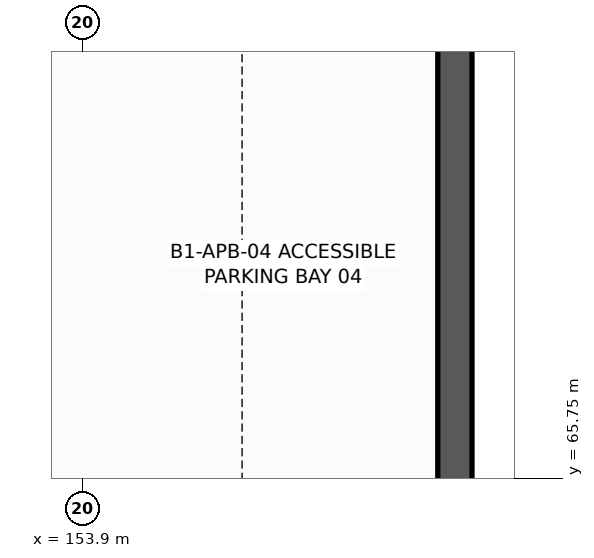
"""IFC4 building model, lengths in metres.
Left out: names, types, materials, properties, quantities, classifications, styles, units other than length and angle.
Written with IfcOpenShell. Run it as: python <this file> out.ifc"""

import sys

from ifc_helpers import new_model, si_unit, direction, frame, frame_2d, origin, place, context, subcontext, project, spatial, rectangle, extrude, element, save


model = new_model("IFC4")
c1 = context("Model", 3, precision=1e-05, world=origin(), true_north=direction((0.0, 1.0)))
c2 = subcontext(c1, "Body", "Model", "MODEL_VIEW")
j1 = project(units=[si_unit("LENGTHUNIT", "METRE"), si_unit("PLANEANGLEUNIT", "RADIAN")], contexts=[c1])
p1 = place(None, origin())
s1 = spatial("IfcSite", under=j1, at=p1, CompositionType="ELEMENT")
p2 = place(p1, origin())
s2 = spatial("IfcBuilding", under=s1, at=p2, CompositionType="ELEMENT")
p3 = place(p2, frame((0.0, 0.0, -5.4)))
s3 = spatial("IfcBuildingStorey", under=s2, at=p3, CompositionType="ELEMENT", Elevation=-5.4)
p4 = place(p3, frame((158.8, 64.8, 0.0), z_axis=(0.0, 0.0, 1.0), x_axis=(0.0, 1.0, 0.0)))
e1 = element("IfcWall", 1, at=p4, inside=s3, PredefinedType="USERDEFINED", context=c2, shape_type="SweptSolid", body=[
    extrude(rectangle(XDim=8.1, YDim=0.45, at=frame_2d((4.05, 0.0))), origin(), (0.0, 0.0, 1.0), 5.1),
])
save(model, sys.argv[1])
